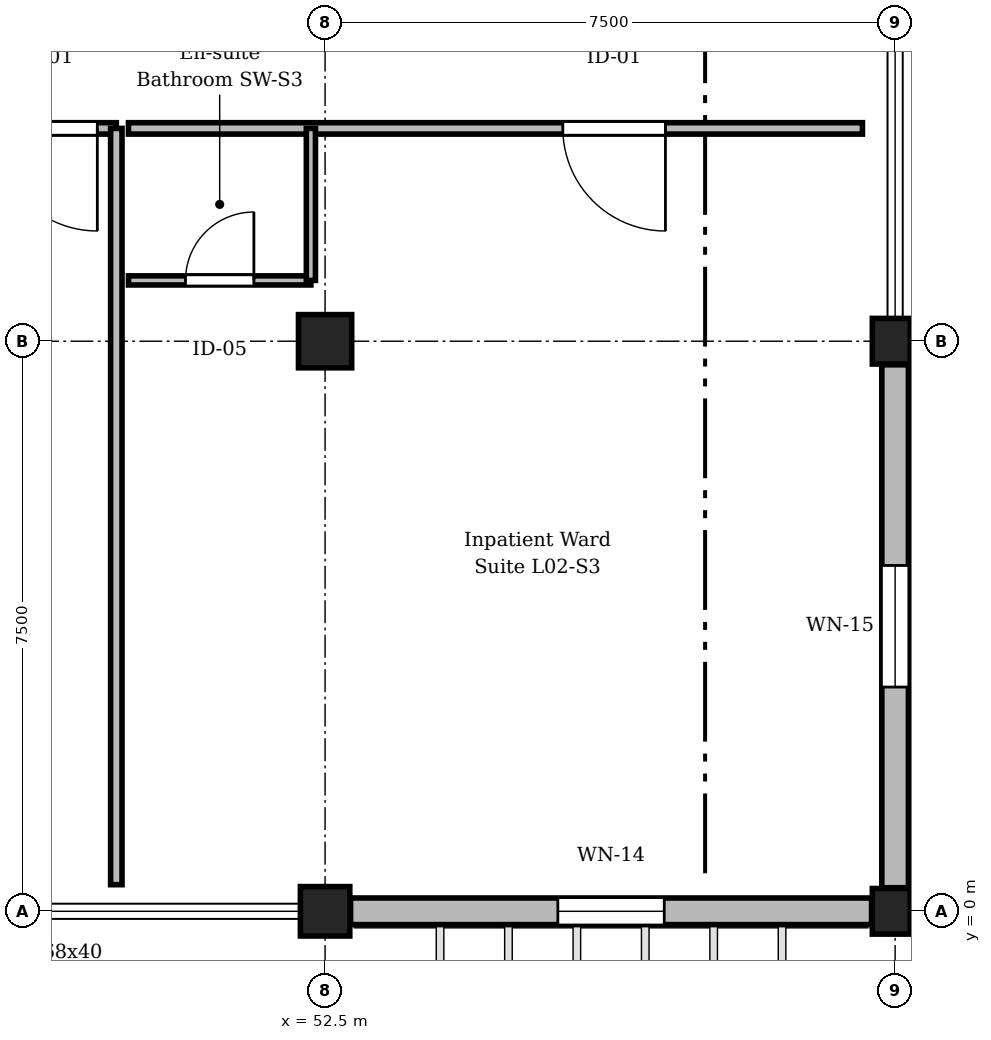
"""IFC4 building model, lengths in metres.
Left out: names, types, materials, properties, quantities, classifications, styles, units other than length and angle.
Written with IfcOpenShell. Run it as: python <this file> out.ifc"""

import sys

from ifc_helpers import new_model, si_unit, direction, frame, frame_2d, origin, origin_2d, place, context, subcontext, project, spatial, rectangle, circle, extrude, element, fill, save


model = new_model("IFC4")
c1 = context("Model", 3, precision=1e-05, world=origin(), true_north=direction((0.0, 1.0)))
c2 = subcontext(c1, "Body", "Model", "MODEL_VIEW")
j1 = project(units=[si_unit("LENGTHUNIT", "METRE"), si_unit("PLANEANGLEUNIT", "RADIAN")], contexts=[c1])
p1 = place(None, origin())
s1 = spatial("IfcSite", under=j1, at=p1, CompositionType="ELEMENT")
p2 = place(p1, origin())
s2 = spatial("IfcBuilding", under=s1, at=p2, CompositionType="ELEMENT")
p3 = place(p2, frame((0.0, 0.0, 9.3)))
s3 = spatial("IfcBuildingStorey", under=s2, at=p3, CompositionType="ELEMENT", Elevation=9.3)
p4 = place(p3, frame((52.5, 0.0, 0.0), z_axis=(0.0, 0.0, 1.0), x_axis=(1.0, 0.0, 0.0)))
e1 = element("IfcColumn", 1, at=p4, inside=s3, PredefinedType="COLUMN", context=c2, shape_type="SweptSolid", body=[
    extrude(rectangle(XDim=0.65, YDim=0.65, at=origin_2d()), origin(), (0.0, 0.0, 1.0), 4.8),
])
p5 = place(p3, frame((52.5, 7.5, 0.0), z_axis=(0.0, 0.0, 1.0), x_axis=(1.0, 0.0, 0.0)))
e2 = element("IfcColumn", 2, at=p5, inside=s3, PredefinedType="COLUMN", context=c2, shape_type="SweptSolid", body=[
    extrude(rectangle(XDim=0.7, YDim=0.7, at=origin_2d()), origin(), (0.0, 0.0, 1.0), 4.8),
])
p6 = place(p3, frame((60.0, 0.0, 0.0), z_axis=(0.0, 0.0, 1.0), x_axis=(1.0, 0.0, 0.0)))
e3 = element("IfcColumn", 3, at=p6, inside=s3, PredefinedType="COLUMN", context=c2, shape_type="SweptSolid", body=[
    extrude(rectangle(XDim=0.6, YDim=0.6, at=origin_2d()), origin(), (0.0, 0.0, 1.0), 4.8),
])
p7 = place(p3, frame((60.0, 7.5, 0.0), z_axis=(0.0, 0.0, 1.0), x_axis=(1.0, 0.0, 0.0)))
e4 = element("IfcColumn", 4, at=p7, inside=s3, PredefinedType="COLUMN", context=c2, shape_type="SweptSolid", body=[
    extrude(circle(Radius=0.3, at=origin_2d()), origin(), (0.0, 0.0, 1.0), 4.8),
])
p8 = place(p3, frame((59.69, 0.0, 0.0), z_axis=(0.0, 0.0, 1.0), x_axis=(-1.0, 0.0, 0.0)))
e5 = element("IfcWall", 5, at=p8, inside=s3, PredefinedType="STANDARD", context=c2, shape_type="SweptSolid", body=[
    extrude(rectangle(XDim=6.855, YDim=0.35, at=frame_2d((3.427, 0.0))), origin(), (0.0, 0.0, 1.0), 3.95),
])
p9 = place(p8, frame((2.728, 0.0, 0.9)))
e6 = element("IfcOpeningElement", 6, at=p9, cuts=e5, PredefinedType="OPENING", context=c2, shape_type="SweptSolid", body=[
    extrude(rectangle(XDim=1.4, YDim=1.8, at=frame_2d((0.7, 0.9))), frame((0.0, 0.185, 0.0), z_axis=(0.0, -1.0, 0.0), x_axis=(1.0, 0.0, 0.0)), (0.0, 0.0, 1.0), 0.37),
])
p10 = place(p3, frame((60.0, 7.19, 0.0), z_axis=(0.0, 0.0, 1.0), x_axis=(0.0, -1.0, 0.0)))
e7 = element("IfcWall", 7, at=p10, inside=s3, PredefinedType="STANDARD", context=c2, shape_type="SweptSolid", body=[
    extrude(rectangle(XDim=6.88, YDim=0.35, at=frame_2d((3.44, 0.0))), origin(), (0.0, 0.0, 1.0), 3.95),
])
p11 = place(p10, frame((2.64, 0.0, 0.9)))
e8 = element("IfcOpeningElement", 8, at=p11, cuts=e7, PredefinedType="OPENING", context=c2, shape_type="SweptSolid", body=[
    extrude(rectangle(XDim=1.6, YDim=1.8, at=frame_2d((0.8, 0.9))), frame((0.0, 0.185, 0.0), z_axis=(0.0, -1.0, 0.0), x_axis=(1.0, 0.0, 0.0)), (0.0, 0.0, 1.0), 0.37),
])
p12 = place(p3, frame((49.753, 10.3, 0.0), z_axis=(0.0, 0.0, 1.0), x_axis=(-1.0, 0.0, 0.0)))
e9 = element("IfcWall", 9, at=p12, inside=s3, PredefinedType="PARTITIONING", context=c2, shape_type="SweptSolid", body=[
    extrude(rectangle(XDim=9.657, YDim=0.15, at=frame_2d((4.828, 0.0))), origin(), (0.0, 0.0, 1.0), 4.535),
])
p13 = place(p12, frame((0.25, 0.0, 0.0)))
e10 = element("IfcOpeningElement", 10, at=p13, cuts=e9, PredefinedType="OPENING", context=c2, shape_type="SweptSolid", body=[
    extrude(rectangle(XDim=1.35, YDim=2.25, at=frame_2d((0.675, 1.125))), frame((0.0, 0.085, 0.0), z_axis=(0.0, -1.0, 0.0), x_axis=(1.0, 0.0, 0.0)), (0.0, 0.0, 1.0), 0.17),
])
p14 = place(p3, frame((59.57, 10.3, 0.0), z_axis=(0.0, 0.0, 1.0), x_axis=(-1.0, 0.0, 0.0)))
e11 = element("IfcWall", 11, at=p14, inside=s3, PredefinedType="PARTITIONING", context=c2, shape_type="SweptSolid", body=[
    extrude(rectangle(XDim=9.657, YDim=0.15, at=frame_2d((4.828, 0.0))), origin(), (0.0, 0.0, 1.0), 4.535),
])
p15 = place(p14, frame((2.592, 0.0, 0.0)))
e12 = element("IfcOpeningElement", 12, at=p15, cuts=e11, PredefinedType="OPENING", context=c2, shape_type="SweptSolid", body=[
    extrude(rectangle(XDim=1.35, YDim=2.25, at=frame_2d((0.675, 1.125))), frame((0.0, 0.085, 0.0), z_axis=(0.0, -1.0, 0.0), x_axis=(1.0, 0.0, 0.0)), (0.0, 0.0, 1.0), 0.17),
])
p16 = place(p3, frame((49.913, 8.3, 0.0), z_axis=(0.0, 0.0, 1.0), x_axis=(1.0, 0.0, 0.0)))
e13 = element("IfcWall", 13, at=p16, inside=s3, PredefinedType="PARTITIONING", context=c2, shape_type="SweptSolid", body=[
    extrude(rectangle(XDim=2.4, YDim=0.12, at=frame_2d((1.2, 0.0))), origin(), (0.0, 0.0, 1.0), 4.535),
])
p17 = place(p16, frame((0.75, 0.0, 0.0)))
e14 = element("IfcOpeningElement", 14, at=p17, cuts=e13, PredefinedType="OPENING", context=c2, shape_type="SweptSolid", body=[
    extrude(rectangle(XDim=0.9, YDim=2.1, at=frame_2d((0.45, 1.05))), frame((0.0, 0.07, 0.0), z_axis=(0.0, -1.0, 0.0), x_axis=(1.0, 0.0, 0.0)), (0.0, 0.0, 1.0), 0.14),
])
p18 = place(p3, frame((52.313, 8.3, 0.0), z_axis=(0.0, 0.0, 1.0), x_axis=(0.0, 1.0, 0.0)))
e15 = element("IfcWall", 15, at=p18, inside=s3, PredefinedType="PARTITIONING", context=c2, shape_type="SweptSolid", body=[
    extrude(rectangle(XDim=2.0, YDim=0.12, at=frame_2d((1.0, 0.0))), origin(), (0.0, 0.0, 1.0), 3.985),
])
p19 = place(p3, frame((49.753, 0.35, 0.0), z_axis=(0.0, 0.0, 1.0), x_axis=(0.0, 1.0, 0.0)))
e16 = element("IfcWall", 16, at=p19, inside=s3, PredefinedType="PARTITIONING", context=c2, shape_type="SweptSolid", body=[
    extrude(rectangle(XDim=9.95, YDim=0.15, at=frame_2d((4.975, 0.0))), origin(), (0.0, 0.0, 1.0), 4.535),
])
p20 = place(p9, origin())
e17 = element("IfcWindow", 17, at=p20, inside=s3, PartitioningType="SINGLE_PANEL", PredefinedType="WINDOW", context=c2, shape_type="SweptSolid", body=[
    extrude(rectangle(XDim=1.4, YDim=1.8, at=frame_2d((0.7, 0.9))), frame((0.0, 0.03, 0.0), z_axis=(0.0, -1.0, 0.0), x_axis=(1.0, 0.0, 0.0)), (0.0, 0.0, 1.0), 0.06),
])
fill(e6, e17)
p21 = place(p11, origin())
e18 = element("IfcWindow", 18, at=p21, inside=s3, PartitioningType="SINGLE_PANEL", PredefinedType="WINDOW", context=c2, shape_type="SweptSolid", body=[
    extrude(rectangle(XDim=1.6, YDim=1.8, at=frame_2d((0.8, 0.9))), frame((0.0, 0.03, 0.0), z_axis=(0.0, -1.0, 0.0), x_axis=(1.0, 0.0, 0.0)), (0.0, 0.0, 1.0), 0.06),
])
fill(e8, e18)
p22 = place(p13, origin())
e19 = element("IfcDoor", 19, at=p22, inside=s3, OperationType="SINGLE_SWING_LEFT", PredefinedType="DOOR", context=c2, shape_type="SweptSolid", body=[
    extrude(rectangle(XDim=1.35, YDim=2.25, at=frame_2d((0.675, 1.125))), frame((0.0, 0.025, 0.0), z_axis=(0.0, -1.0, 0.0), x_axis=(1.0, 0.0, 0.0)), (0.0, 0.0, 1.0), 0.05),
])
fill(e10, e19)
p23 = place(p15, origin())
e20 = element("IfcDoor", 20, at=p23, inside=s3, OperationType="SINGLE_SWING_LEFT", PredefinedType="DOOR", context=c2, shape_type="SweptSolid", body=[
    extrude(rectangle(XDim=1.35, YDim=2.25, at=frame_2d((0.675, 1.125))), frame((0.0, 0.025, 0.0), z_axis=(0.0, -1.0, 0.0), x_axis=(1.0, 0.0, 0.0)), (0.0, 0.0, 1.0), 0.05),
])
fill(e12, e20)
p24 = place(p17, origin())
e21 = element("IfcDoor", 21, at=p24, inside=s3, OperationType="SINGLE_SWING_RIGHT", PredefinedType="DOOR", context=c2, shape_type="SweptSolid", body=[
    extrude(rectangle(XDim=0.9, YDim=2.1, at=frame_2d((0.45, 1.05))), frame((0.0, 0.025, 0.0), z_axis=(0.0, -1.0, 0.0), x_axis=(1.0, 0.0, 0.0)), (0.0, 0.0, 1.0), 0.05),
])
fill(e14, e21)
save(model, sys.argv[1])
